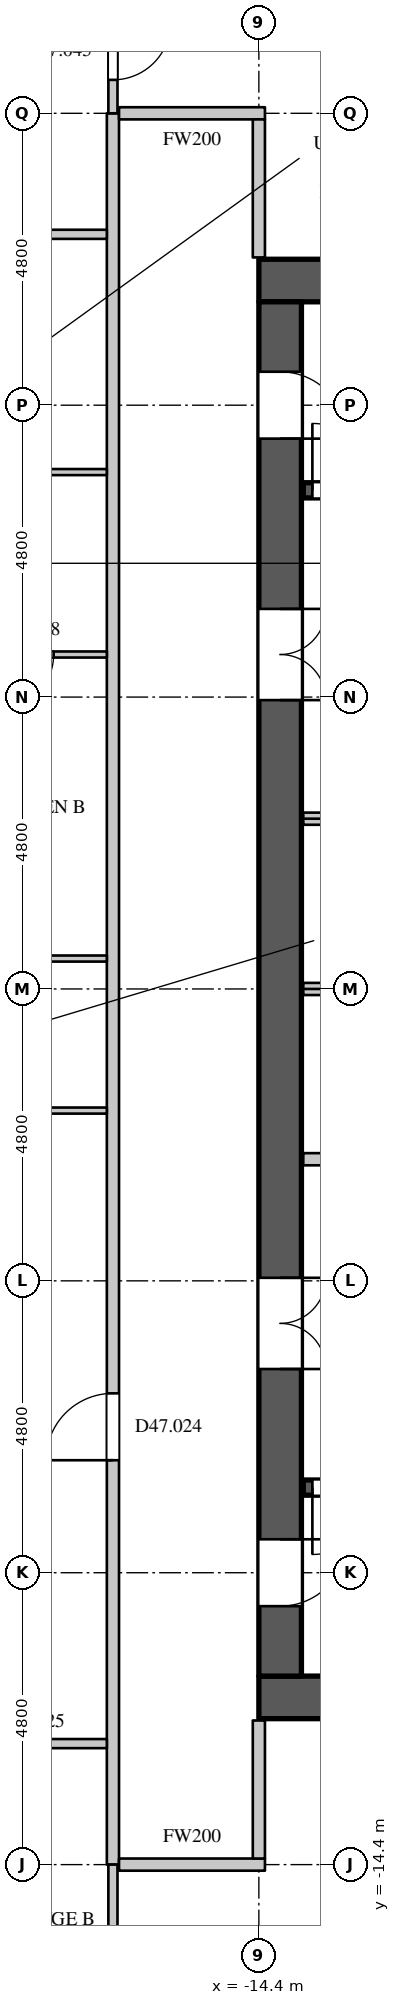
"""IFC4 building model, lengths in metres.
Left out: names, types, materials, properties, quantities, classifications, styles, units other than length and angle.
Written with IfcOpenShell. Run it as: python <this file> out.ifc"""

import sys

from ifc_helpers import new_model, si_unit, direction, frame, frame_2d, origin, place, context, subcontext, project, spatial, rectangle, extrude, element, fill, save


model = new_model("IFC4")
c1 = context("Model", 3, precision=1e-05, world=origin(), true_north=direction((0.0, 1.0)))
c2 = subcontext(c1, "Body", "Model", "MODEL_VIEW")
j1 = project(units=[si_unit("LENGTHUNIT", "METRE"), si_unit("PLANEANGLEUNIT", "RADIAN")], contexts=[c1])
p1 = place(None, origin())
s1 = spatial("IfcSite", under=j1, at=p1, CompositionType="ELEMENT")
p2 = place(p1, origin())
s2 = spatial("IfcBuilding", under=s1, at=p2, CompositionType="ELEMENT")
p3 = place(p2, frame((0.0, 0.0, 204.3)))
s3 = spatial("IfcBuildingStorey", under=s2, at=p3, CompositionType="ELEMENT", Elevation=204.3)
for number, where, z_axis, x_axis in (
    (1, (-14.4, 11.65, 0.0), (0.0, 0.0, 1.0), (1.0, 0.0, 0.0)),
    (2, (-14.4, -11.65, 0.0), (0.0, 0.0, 1.0), (1.0, 0.0, 0.0)),
):
    element("IfcWall", number, at=place(p3, frame(where, z_axis=z_axis, x_axis=x_axis)), inside=s3, PredefinedType="SHEAR", context=c2, shape_type="SweptSolid", body=[
        extrude(rectangle(XDim=28.8, YDim=0.7, at=frame_2d((14.4, 0.0))), origin(), (0.0, 0.0, 1.0), 4.2),
    ])
p4 = place(p3, frame((-14.05, -11.3, 0.0), z_axis=(0.0, 0.0, 1.0), x_axis=(0.0, 1.0, 0.0)))
e3 = element("IfcWall", 3, at=p4, inside=s3, PredefinedType="SHEAR", context=c2, shape_type="SweptSolid", body=[
    extrude(rectangle(XDim=22.6, YDim=0.7, at=frame_2d((11.3, 0.0))), origin(), (0.0, 0.0, 1.0), 4.2),
])
p5 = place(p4, frame((20.35, 0.0, 0.0)))
e4 = element("IfcOpeningElement", 4, at=p5, cuts=e3, PredefinedType="OPENING", context=c2, shape_type="SweptSolid", body=[
    extrude(rectangle(XDim=1.1, YDim=2.2, at=frame_2d((0.55, 1.1))), frame((0.0, 0.36, 0.0), z_axis=(0.0, -1.0, 0.0), x_axis=(1.0, 0.0, 0.0)), (0.0, 0.0, 1.0), 0.72),
])
p6 = place(p4, frame((1.15, 0.0, 0.0)))
e5 = element("IfcOpeningElement", 5, at=p6, cuts=e3, PredefinedType="OPENING", context=c2, shape_type="SweptSolid", body=[
    extrude(rectangle(XDim=1.1, YDim=2.2, at=frame_2d((0.55, 1.1))), frame((0.0, 0.36, 0.0), z_axis=(0.0, -1.0, 0.0), x_axis=(1.0, 0.0, 0.0)), (0.0, 0.0, 1.0), 0.72),
])
p7 = place(p4, frame((16.05, 0.0, 0.0)))
e6 = element("IfcOpeningElement", 6, at=p7, cuts=e3, PredefinedType="OPENING", context=c2, shape_type="SweptSolid", body=[
    extrude(rectangle(XDim=1.5, YDim=2.4, at=frame_2d((0.75, 1.2))), frame((0.0, 0.36, 0.0), z_axis=(0.0, -1.0, 0.0), x_axis=(1.0, 0.0, 0.0)), (0.0, 0.0, 1.0), 0.72),
])
p8 = place(p4, frame((5.05, 0.0, 0.0)))
e7 = element("IfcOpeningElement", 7, at=p8, cuts=e3, PredefinedType="OPENING", context=c2, shape_type="SweptSolid", body=[
    extrude(rectangle(XDim=1.5, YDim=2.4, at=frame_2d((0.75, 1.2))), frame((0.0, 0.36, 0.0), z_axis=(0.0, -1.0, 0.0), x_axis=(1.0, 0.0, 0.0)), (0.0, 0.0, 1.0), 0.72),
])
p9 = place(p3, frame((-16.8, -14.4, 0.0), z_axis=(0.0, 0.0, 1.0), x_axis=(0.0, 1.0, 0.0)))
e8 = element("IfcWall", 8, at=p9, inside=s3, PredefinedType="PARTITIONING", context=c2, shape_type="SweptSolid", body=[
    extrude(rectangle(XDim=28.8, YDim=0.2, at=frame_2d((14.4, 0.0))), origin(), (0.0, 0.0, 1.0), 3.798),
])
p10 = place(p9, frame((6.65, 0.0, 0.0)))
e9 = element("IfcOpeningElement", 9, at=p10, cuts=e8, PredefinedType="OPENING", context=c2, shape_type="SweptSolid", body=[
    extrude(rectangle(XDim=1.1, YDim=2.4, at=frame_2d((0.55, 1.2))), frame((0.0, 0.11, 0.0), z_axis=(0.0, -1.0, 0.0), x_axis=(1.0, 0.0, 0.0)), (0.0, 0.0, 1.0), 0.22),
])
for number, where, z_axis, x_axis in (
    (10, (-16.7, -14.4, 0.0), (0.0, 0.0, 1.0), (1.0, 0.0, 0.0)),
    (11, (-16.7, 14.4, 0.0), (0.0, 0.0, 1.0), (1.0, 0.0, 0.0)),
):
    element("IfcWall", number, at=place(p3, frame(where, z_axis=z_axis, x_axis=x_axis)), inside=s3, PredefinedType="PARTITIONING", context=c2, shape_type="SweptSolid", body=[
        extrude(rectangle(XDim=2.4, YDim=0.2, at=frame_2d((1.2, 0.0))), origin(), (0.0, 0.0, 1.0), 3.798),
    ])
for number, where, z_axis, x_axis in (
    (12, (-14.4, -14.3, 0.0), (0.0, 0.0, 1.0), (0.0, 1.0, 0.0)),
    (13, (-14.4, 12.03, 0.0), (0.0, 0.0, 1.0), (0.0, 1.0, 0.0)),
):
    element("IfcWall", number, at=place(p3, frame(where, z_axis=z_axis, x_axis=x_axis)), inside=s3, PredefinedType="PARTITIONING", context=c2, shape_type="SweptSolid", body=[
        extrude(rectangle(XDim=2.27, YDim=0.2, at=frame_2d((1.135, 0.0))), origin(), (0.0, 0.0, 1.0), 3.798),
    ])
p11 = place(p3, frame((-22.529, -12.41, 0.0), z_axis=(0.0, 0.0, 1.0), x_axis=(1.0, 0.0, 0.0)))
e14 = element("IfcWall", 14, at=p11, inside=s3, PredefinedType="PARTITIONING", context=c2, shape_type="SweptSolid", body=[
    extrude(rectangle(XDim=5.629, YDim=0.15, at=frame_2d((2.815, 0.0))), origin(), (0.0, 0.0, 1.0), 3.798),
])
p12 = place(p11, frame((3.56, 0.0, 0.0)))
e15 = element("IfcOpeningElement", 15, at=p12, cuts=e14, PredefinedType="OPENING", context=c2, shape_type="SweptSolid", body=[
    extrude(rectangle(XDim=0.95, YDim=2.2, at=frame_2d((0.475, 1.1))), frame((0.0, 0.085, 0.0), z_axis=(0.0, -1.0, 0.0), x_axis=(1.0, 0.0, 0.0)), (0.0, 0.0, 1.0), 0.17),
])
p13 = place(p3, frame((-22.529, 12.41, 0.0), z_axis=(0.0, 0.0, 1.0), x_axis=(1.0, 0.0, 0.0)))
e16 = element("IfcWall", 16, at=p13, inside=s3, PredefinedType="PARTITIONING", context=c2, shape_type="SweptSolid", body=[
    extrude(rectangle(XDim=5.629, YDim=0.15, at=frame_2d((2.815, 0.0))), origin(), (0.0, 0.0, 1.0), 3.798),
])
p14 = place(p13, frame((0.76, 0.0, 0.0)))
e17 = element("IfcOpeningElement", 17, at=p14, cuts=e16, PredefinedType="OPENING", context=c2, shape_type="SweptSolid", body=[
    extrude(rectangle(XDim=0.95, YDim=2.2, at=frame_2d((0.475, 1.1))), frame((0.0, 0.085, 0.0), z_axis=(0.0, -1.0, 0.0), x_axis=(1.0, 0.0, 0.0)), (0.0, 0.0, 1.0), 0.17),
])
p15 = place(p3, frame((-16.8, -18.131, 0.0), z_axis=(0.0, 0.0, 1.0), x_axis=(0.0, 1.0, 0.0)))
e18 = element("IfcWall", 18, at=p15, inside=s3, PredefinedType="PARTITIONING", context=c2, shape_type="SweptSolid", body=[
    extrude(rectangle(XDim=3.731, YDim=0.15, at=frame_2d((1.865, 0.0))), origin(), (0.0, 0.0, 1.0), 3.798),
])
p16 = place(p15, frame((0.85, 0.0, 0.0)))
e19 = element("IfcOpeningElement", 19, at=p16, cuts=e18, PredefinedType="OPENING", context=c2, shape_type="SweptSolid", body=[
    extrude(rectangle(XDim=0.95, YDim=2.2, at=frame_2d((0.475, 1.1))), frame((0.0, 0.085, 0.0), z_axis=(0.0, -1.0, 0.0), x_axis=(1.0, 0.0, 0.0)), (0.0, 0.0, 1.0), 0.17),
])
p17 = place(p3, frame((-16.8, 14.4, 0.0), z_axis=(0.0, 0.0, 1.0), x_axis=(0.0, 1.0, 0.0)))
e20 = element("IfcWall", 20, at=p17, inside=s3, PredefinedType="PARTITIONING", context=c2, shape_type="SweptSolid", body=[
    extrude(rectangle(XDim=3.731, YDim=0.15, at=frame_2d((1.865, 0.0))), origin(), (0.0, 0.0, 1.0), 3.798),
])
p18 = place(p17, frame((0.55, 0.0, 0.0)))
e21 = element("IfcOpeningElement", 21, at=p18, cuts=e20, PredefinedType="OPENING", context=c2, shape_type="SweptSolid", body=[
    extrude(rectangle(XDim=0.95, YDim=2.2, at=frame_2d((0.475, 1.1))), frame((0.0, 0.085, 0.0), z_axis=(0.0, -1.0, 0.0), x_axis=(1.0, 0.0, 0.0)), (0.0, 0.0, 1.0), 0.17),
])
p19 = place(p3, frame((-13.67, -2.8, 0.0), z_axis=(0.0, 0.0, 1.0), x_axis=(1.0, 0.0, 0.0)))
e22 = element("IfcWall", 22, at=p19, inside=s3, PredefinedType="PARTITIONING", context=c2, shape_type="SweptSolid", body=[
    extrude(rectangle(XDim=3.27, YDim=0.2, at=frame_2d((1.635, 0.0))), origin(), (0.0, 0.0, 1.0), 3.798),
])
p20 = place(p19, frame((1.3, 0.0, 0.0)))
e23 = element("IfcOpeningElement", 23, at=p20, cuts=e22, PredefinedType="OPENING", context=c2, shape_type="SweptSolid", body=[
    extrude(rectangle(XDim=0.6, YDim=2.0, at=frame_2d((0.3, 1.0))), frame((0.0, 0.11, 0.0), z_axis=(0.0, -1.0, 0.0), x_axis=(1.0, 0.0, 0.0)), (0.0, 0.0, 1.0), 0.22),
])
p21 = place(p3, frame((-13.67, 0.0, 0.0), z_axis=(0.0, 0.0, 1.0), x_axis=(1.0, 0.0, 0.0)))
e24 = element("IfcWall", 24, at=p21, inside=s3, PredefinedType="PARTITIONING", context=c2, shape_type="SweptSolid", body=[
    extrude(rectangle(XDim=21.47, YDim=0.2, at=frame_2d((10.735, 0.0))), origin(), (0.0, 0.0, 1.0), 3.798),
])
p22 = place(p3, frame((-13.67, 2.8, 0.0), z_axis=(0.0, 0.0, 1.0), x_axis=(1.0, 0.0, 0.0)))
e25 = element("IfcWall", 25, at=p22, inside=s3, PredefinedType="PARTITIONING", context=c2, shape_type="SweptSolid", body=[
    extrude(rectangle(XDim=5.85, YDim=0.2, at=frame_2d((2.925, 0.0))), origin(), (0.0, 0.0, 1.0), 3.798),
])
p23 = place(p22, frame((1.05, 0.0, 0.0)))
e26 = element("IfcOpeningElement", 26, at=p23, cuts=e25, PredefinedType="OPENING", context=c2, shape_type="SweptSolid", body=[
    extrude(rectangle(XDim=1.1, YDim=2.2, at=frame_2d((0.55, 1.1))), frame((0.0, 0.11, 0.0), z_axis=(0.0, -1.0, 0.0), x_axis=(1.0, 0.0, 0.0)), (0.0, 0.0, 1.0), 0.22),
])
p24 = place(p22, frame((4.0, 0.0, 0.0)))
e27 = element("IfcOpeningElement", 27, at=p24, cuts=e25, PredefinedType="OPENING", context=c2, shape_type="SweptSolid", body=[
    extrude(rectangle(XDim=1.1, YDim=2.2, at=frame_2d((0.55, 1.1))), frame((0.0, 0.11, 0.0), z_axis=(0.0, -1.0, 0.0), x_axis=(1.0, 0.0, 0.0)), (0.0, 0.0, 1.0), 0.22),
])
p25 = place(p3, frame((-13.67, -8.2, 0.0), z_axis=(0.0, 0.0, 1.0), x_axis=(1.0, 0.0, 0.0)))
e28 = element("IfcWall", 28, at=p25, inside=s3, PredefinedType="SHEAR", context=c2, shape_type="SweptSolid", body=[
    extrude(rectangle(XDim=8.395, YDim=0.25, at=frame_2d((4.198, 0.0))), origin(), (0.0, 0.0, 1.0), 3.798),
])
p26 = place(p25, frame((0.15, 0.0, 0.0)))
e29 = element("IfcOpeningElement", 29, at=p26, cuts=e28, PredefinedType="OPENING", context=c2, shape_type="SweptSolid", body=[
    extrude(rectangle(XDim=1.1, YDim=2.2, at=frame_2d((0.55, 1.1))), frame((0.0, 0.135, 0.0), z_axis=(0.0, -1.0, 0.0), x_axis=(1.0, 0.0, 0.0)), (0.0, 0.0, 1.0), 0.27),
])
p27 = place(p3, frame((-13.67, 8.2, 0.0), z_axis=(0.0, 0.0, 1.0), x_axis=(1.0, 0.0, 0.0)))
e30 = element("IfcWall", 30, at=p27, inside=s3, PredefinedType="SHEAR", context=c2, shape_type="SweptSolid", body=[
    extrude(rectangle(XDim=8.395, YDim=0.25, at=frame_2d((4.198, 0.0))), origin(), (0.0, 0.0, 1.0), 3.798),
])
p28 = place(p27, frame((0.15, 0.0, 0.0)))
e31 = element("IfcOpeningElement", 31, at=p28, cuts=e30, PredefinedType="OPENING", context=c2, shape_type="SweptSolid", body=[
    extrude(rectangle(XDim=1.1, YDim=2.2, at=frame_2d((0.55, 1.1))), frame((0.0, 0.135, 0.0), z_axis=(0.0, -1.0, 0.0), x_axis=(1.0, 0.0, 0.0)), (0.0, 0.0, 1.0), 0.27),
])
p29 = place(p3, frame((-20.45, -2.0, 0.0), z_axis=(0.0, 0.0, 1.0), x_axis=(1.0, 0.0, 0.0)))
e32 = element("IfcWall", 32, at=p29, inside=s3, PredefinedType="PARTITIONING", context=c2, shape_type="SweptSolid", body=[
    extrude(rectangle(XDim=3.55, YDim=0.1, at=frame_2d((1.775, 0.0))), origin(), (0.0, 0.0, 1.0), 3.798),
])
p30 = place(p29, frame((1.3, 0.0, 0.0)))
e33 = element("IfcOpeningElement", 33, at=p30, cuts=e32, PredefinedType="OPENING", context=c2, shape_type="SweptSolid", body=[
    extrude(rectangle(XDim=0.9, YDim=2.2, at=frame_2d((0.45, 1.1))), frame((0.0, 0.06, 0.0), z_axis=(0.0, -1.0, 0.0), x_axis=(1.0, 0.0, 0.0)), (0.0, 0.0, 1.0), 0.12),
])
p31 = place(p3, frame((-20.425, 0.5, 0.0), z_axis=(0.0, 0.0, 1.0), x_axis=(1.0, 0.0, 0.0)))
e34 = element("IfcWall", 34, at=p31, inside=s3, PredefinedType="PARTITIONING", context=c2, shape_type="SweptSolid", body=[
    extrude(rectangle(XDim=3.525, YDim=0.1, at=frame_2d((1.763, 0.0))), origin(), (0.0, 0.0, 1.0), 3.798),
])
p32 = place(p3, frame((-19.475, 5.5, 0.0), z_axis=(0.0, 0.0, 1.0), x_axis=(1.0, 0.0, 0.0)))
e35 = element("IfcWall", 35, at=p32, inside=s3, PredefinedType="PARTITIONING", context=c2, shape_type="SweptSolid", body=[
    extrude(rectangle(XDim=2.575, YDim=0.1, at=frame_2d((1.288, 0.0))), origin(), (0.0, 0.0, 1.0), 3.798),
])
p33 = place(p32, frame((0.8, 0.0, 0.0)))
e36 = element("IfcOpeningElement", 36, at=p33, cuts=e35, PredefinedType="OPENING", context=c2, shape_type="SweptSolid", body=[
    extrude(rectangle(XDim=0.9, YDim=2.2, at=frame_2d((0.45, 1.1))), frame((0.0, 0.06, 0.0), z_axis=(0.0, -1.0, 0.0), x_axis=(1.0, 0.0, 0.0)), (0.0, 0.0, 1.0), 0.12),
])
p34 = place(p3, frame((-19.475, 8.5, 0.0), z_axis=(0.0, 0.0, 1.0), x_axis=(1.0, 0.0, 0.0)))
e37 = element("IfcWall", 37, at=p34, inside=s3, PredefinedType="PARTITIONING", context=c2, shape_type="SweptSolid", body=[
    extrude(rectangle(XDim=2.575, YDim=0.1, at=frame_2d((1.288, 0.0))), origin(), (0.0, 0.0, 1.0), 3.798),
])
p35 = place(p28, origin())
e38 = element("IfcDoor", 38, at=p35, inside=s3, OperationType="SINGLE_SWING_LEFT", PredefinedType="DOOR", context=c2, shape_type="SweptSolid", body=[
    extrude(rectangle(XDim=1.1, YDim=2.2, at=frame_2d((0.55, 1.1))), frame((0.0, 0.025, 0.0), z_axis=(0.0, -1.0, 0.0), x_axis=(1.0, 0.0, 0.0)), (0.0, 0.0, 1.0), 0.05),
])
fill(e31, e38)
p36 = place(p26, origin())
e39 = element("IfcDoor", 39, at=p36, inside=s3, OperationType="SINGLE_SWING_RIGHT", PredefinedType="DOOR", context=c2, shape_type="SweptSolid", body=[
    extrude(rectangle(XDim=1.1, YDim=2.2, at=frame_2d((0.55, 1.1))), frame((0.0, 0.025, 0.0), z_axis=(0.0, -1.0, 0.0), x_axis=(1.0, 0.0, 0.0)), (0.0, 0.0, 1.0), 0.05),
])
fill(e29, e39)
p37 = place(p5, origin())
e40 = element("IfcDoor", 40, at=p37, inside=s3, OperationType="SINGLE_SWING_RIGHT", PredefinedType="DOOR", context=c2, shape_type="SweptSolid", body=[
    extrude(rectangle(XDim=1.1, YDim=2.2, at=frame_2d((0.55, 1.1))), frame((0.0, -0.295, 0.0), z_axis=(0.0, -1.0, 0.0), x_axis=(1.0, 0.0, 0.0)), (0.0, 0.0, 1.0), 0.05),
])
fill(e4, e40)
p38 = place(p6, origin())
e41 = element("IfcDoor", 41, at=p38, inside=s3, OperationType="SINGLE_SWING_LEFT", PredefinedType="DOOR", context=c2, shape_type="SweptSolid", body=[
    extrude(rectangle(XDim=1.1, YDim=2.2, at=frame_2d((0.55, 1.1))), frame((0.0, -0.295, 0.0), z_axis=(0.0, -1.0, 0.0), x_axis=(1.0, 0.0, 0.0)), (0.0, 0.0, 1.0), 0.05),
])
fill(e5, e41)
p39 = place(p7, origin())
e42 = element("IfcDoor", 42, at=p39, inside=s3, OperationType="DOUBLE_DOOR_SINGLE_SWING", PredefinedType="DOOR", context=c2, shape_type="SweptSolid", body=[
    extrude(rectangle(XDim=1.5, YDim=2.4, at=frame_2d((0.75, 1.2))), frame((0.0, -0.295, 0.0), z_axis=(0.0, -1.0, 0.0), x_axis=(1.0, 0.0, 0.0)), (0.0, 0.0, 1.0), 0.05),
])
fill(e6, e42)
p40 = place(p8, origin())
e43 = element("IfcDoor", 43, at=p40, inside=s3, OperationType="DOUBLE_DOOR_SINGLE_SWING", PredefinedType="DOOR", context=c2, shape_type="SweptSolid", body=[
    extrude(rectangle(XDim=1.5, YDim=2.4, at=frame_2d((0.75, 1.2))), frame((0.0, -0.295, 0.0), z_axis=(0.0, -1.0, 0.0), x_axis=(1.0, 0.0, 0.0)), (0.0, 0.0, 1.0), 0.05),
])
fill(e7, e43)
p41 = place(p10, origin())
e44 = element("IfcDoor", 44, at=p41, inside=s3, OperationType="SINGLE_SWING_LEFT", PredefinedType="DOOR", context=c2, shape_type="SweptSolid", body=[
    extrude(rectangle(XDim=1.1, YDim=2.4, at=frame_2d((0.55, 1.2))), frame((0.0, 0.025, 0.0), z_axis=(0.0, -1.0, 0.0), x_axis=(1.0, 0.0, 0.0)), (0.0, 0.0, 1.0), 0.05),
])
fill(e9, e44)
p42 = place(p18, origin())
e45 = element("IfcDoor", 45, at=p42, inside=s3, OperationType="SINGLE_SWING_LEFT", PredefinedType="DOOR", context=c2, shape_type="SweptSolid", body=[
    extrude(rectangle(XDim=0.95, YDim=2.2, at=frame_2d((0.475, 1.1))), frame((0.0, 0.025, 0.0), z_axis=(0.0, -1.0, 0.0), x_axis=(1.0, 0.0, 0.0)), (0.0, 0.0, 1.0), 0.05),
])
fill(e21, e45)
p43 = place(p33, origin())
e46 = element("IfcDoor", 46, at=p43, inside=s3, OperationType="SINGLE_SWING_RIGHT", PredefinedType="DOOR", context=c2, shape_type="SweptSolid", body=[
    extrude(rectangle(XDim=0.9, YDim=2.2, at=frame_2d((0.45, 1.1))), frame((0.0, 0.025, 0.0), z_axis=(0.0, -1.0, 0.0), x_axis=(1.0, 0.0, 0.0)), (0.0, 0.0, 1.0), 0.05),
])
fill(e36, e46)
save(model, sys.argv[1])
